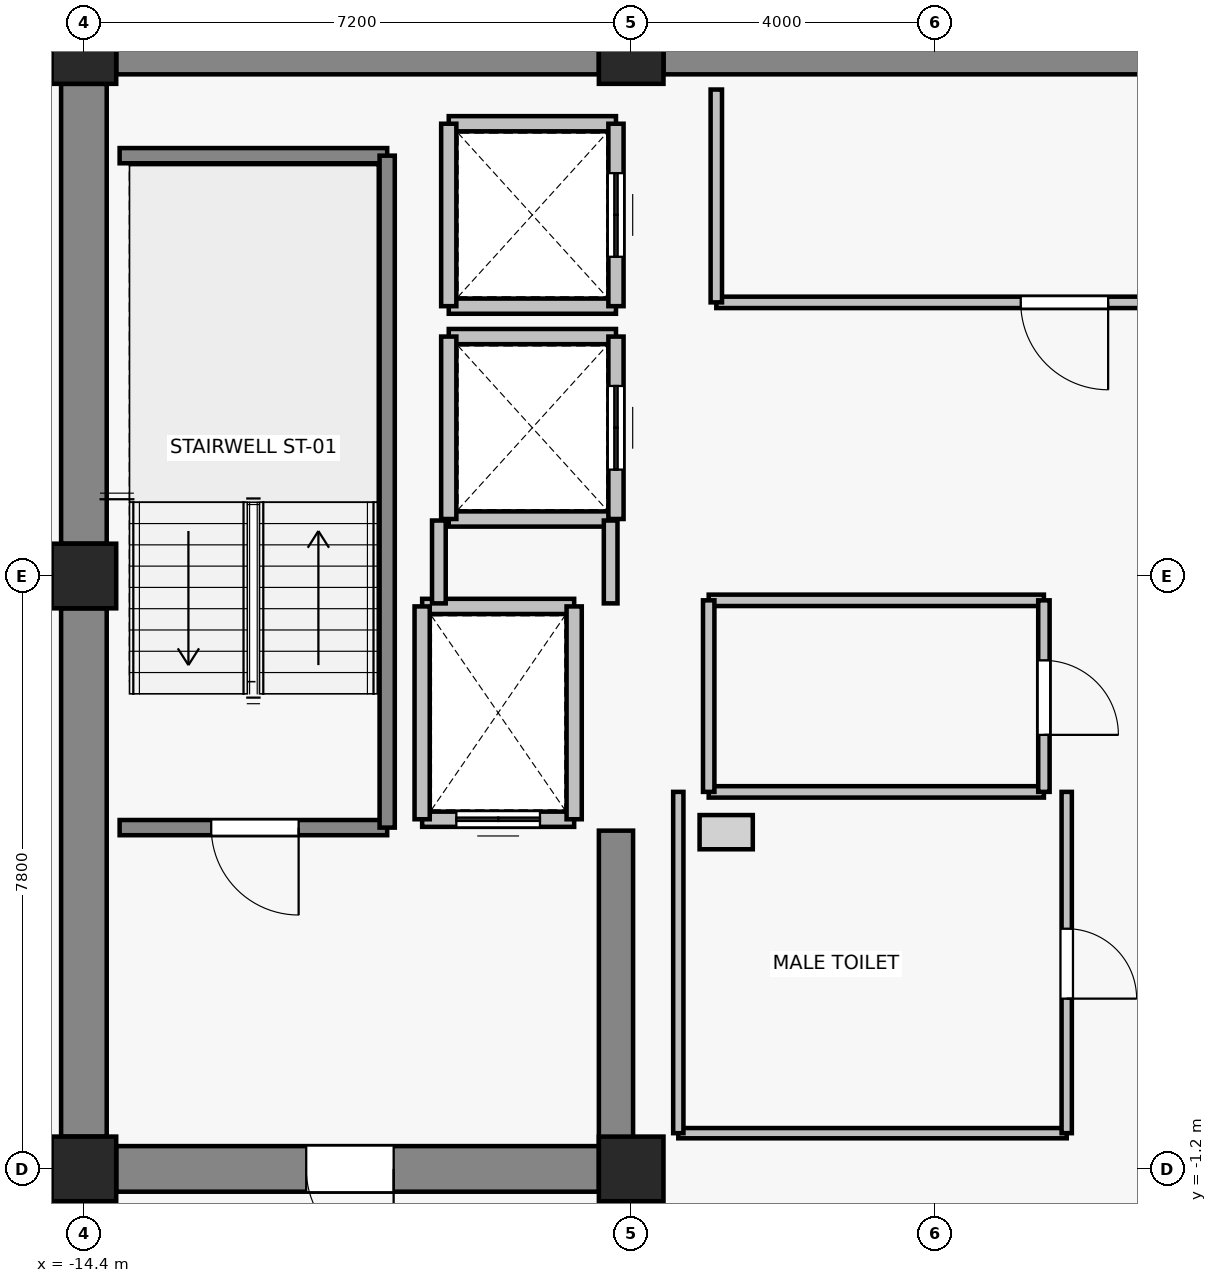
"""IFC4 building model, lengths in metres.
Left out: names, types, materials, properties, quantities, classifications, styles, units other than length and angle.
Written with IfcOpenShell. Run it as: python <this file> out.ifc"""

import sys

from ifc_helpers import new_model, si_unit, direction, frame, frame_2d, origin, origin_2d, place, context, subcontext, project, spatial, rectangle, extrude, source, transform, mapped, element, fill, save


model = new_model("IFC4")
c1 = context("Model", 3, precision=1e-05, world=origin(), true_north=direction((0.0, 1.0)))
c2 = subcontext(c1, "Body", "Model", "MODEL_VIEW")
j1 = project(units=[si_unit("LENGTHUNIT", "METRE"), si_unit("PLANEANGLEUNIT", "RADIAN")], contexts=[c1])
p1 = place(None, origin())
s1 = spatial("IfcSite", under=j1, at=p1, CompositionType="ELEMENT")
p2 = place(p1, origin())
s2 = spatial("IfcBuilding", under=s1, at=p2, CompositionType="ELEMENT")
p3 = place(p2, frame((0.0, 0.0, 265.0)))
s3 = spatial("IfcBuildingStorey", under=s2, at=p3, CompositionType="ELEMENT", Elevation=265.0)
for number, where, z_axis, x_axis in (
    (1, (-14.4, -1.2, 0.0), (0.0, 0.0, 1.0), (1.0, 0.0, 0.0)),
    (2, (-7.2, -1.2, 0.0), (0.0, 0.0, 1.0), (1.0, 0.0, 0.0)),
    (3, (-14.4, 6.6, 0.0), (0.0, 0.0, 1.0), (1.0, 0.0, 0.0)),
    (4, (-14.4, 13.5, 0.0), (0.0, 0.0, 1.0), (1.0, 0.0, 0.0)),
    (5, (-7.2, 13.5, 0.0), (0.0, 0.0, 1.0), (1.0, 0.0, 0.0)),
):
    element("IfcColumn", number, at=place(p3, frame(where, z_axis=z_axis, x_axis=x_axis)), inside=s3, PredefinedType="COLUMN", context=c2, shape_type="SweptSolid", body=[
        extrude(rectangle(XDim=0.85, YDim=0.85, at=origin_2d()), origin(), (0.0, 0.0, 1.0), 3.3),
    ])
p4 = place(p3, frame((-13.975, 13.5, 0.0), z_axis=(0.0, 0.0, 1.0), x_axis=(1.0, 0.0, 0.0)))
e6 = element("IfcWall", 6, at=p4, inside=s3, PredefinedType="SHEAR", context=c2, shape_type="SweptSolid", body=[
    extrude(rectangle(XDim=6.35, YDim=0.6, at=frame_2d((3.175, 0.0))), origin(), (0.0, 0.0, 1.0), 3.075),
])
p5 = place(p3, frame((-6.775, 13.5, 0.0), z_axis=(0.0, 0.0, 1.0), x_axis=(1.0, 0.0, 0.0)))
e7 = element("IfcWall", 7, at=p5, inside=s3, PredefinedType="SHEAR", context=c2, shape_type="SweptSolid", body=[
    extrude(rectangle(XDim=13.55, YDim=0.6, at=frame_2d((6.775, 0.0))), origin(), (0.0, 0.0, 1.0), 3.075),
])
p6 = place(p3, frame((-14.4, -0.775, 0.0), z_axis=(0.0, 0.0, 1.0), x_axis=(0.0, 1.0, 0.0)))
e8 = element("IfcWall", 8, at=p6, inside=s3, PredefinedType="SHEAR", context=c2, shape_type="SweptSolid", body=[
    extrude(rectangle(XDim=6.95, YDim=0.6, at=frame_2d((3.475, 0.0))), origin(), (0.0, 0.0, 1.0), 3.075),
])
p7 = place(p3, frame((-14.4, 7.025, 0.0), z_axis=(0.0, 0.0, 1.0), x_axis=(0.0, 1.0, 0.0)))
e9 = element("IfcWall", 9, at=p7, inside=s3, PredefinedType="SHEAR", context=c2, shape_type="SweptSolid", body=[
    extrude(rectangle(XDim=6.05, YDim=0.6, at=frame_2d((3.025, 0.0))), origin(), (0.0, 0.0, 1.0), 3.075),
])
p8 = place(p3, frame((-7.625, -1.2, 0.0), z_axis=(0.0, 0.0, 1.0), x_axis=(-1.0, 0.0, 0.0)))
e10 = element("IfcWall", 10, at=p8, inside=s3, PredefinedType="SHEAR", context=c2, shape_type="SweptSolid", body=[
    extrude(rectangle(XDim=6.35, YDim=0.6, at=frame_2d((3.175, 0.0))), origin(), (0.0, 0.0, 1.0), 3.075),
])
p9 = place(p8, frame((2.7, 0.0, 0.0)))
e11 = element("IfcOpeningElement", 11, at=p9, cuts=e10, PredefinedType="OPENING", context=c2, shape_type="SweptSolid", body=[
    extrude(rectangle(XDim=1.15, YDim=2.15, at=frame_2d((0.575, 1.075))), frame((0.0, 0.31, 0.0), z_axis=(0.0, -1.0, 0.0), x_axis=(1.0, 0.0, 0.0)), (0.0, 0.0, 1.0), 0.62),
])
p10 = place(p3, frame((-7.4, -0.9, 0.0), z_axis=(0.0, 0.0, 1.0), x_axis=(0.0, 1.0, 0.0)))
e12 = element("IfcWall", 12, at=p10, inside=s3, PredefinedType="SHEAR", context=c2, shape_type="SweptSolid", body=[
    extrude(rectangle(XDim=4.15, YDim=0.45, at=frame_2d((2.075, 0.0))), origin(), (0.0, 0.0, 1.0), 3.075),
])
p11 = place(p3, frame((-7.95, 3.4, 0.0), z_axis=(0.0, 0.0, 1.0), x_axis=(-1.0, 0.0, 0.0)))
e13 = element("IfcWall", 13, at=p11, inside=s3, PredefinedType="SOLIDWALL", context=c2, shape_type="SweptSolid", body=[
    extrude(rectangle(XDim=2.0, YDim=0.2, at=frame_2d((1.0, 0.0))), origin(), (0.0, 0.0, 1.0), 3.075),
])
p12 = place(p11, frame((0.45, 0.0, 0.0)))
e14 = element("IfcOpeningElement", 14, at=p12, cuts=e13, PredefinedType="OPENING", context=c2, shape_type="SweptSolid", body=[
    extrude(rectangle(XDim=1.1, YDim=2.2, at=frame_2d((0.55, 1.1))), frame((0.0, 0.11, 0.0), z_axis=(0.0, -1.0, 0.0), x_axis=(1.0, 0.0, 0.0)), (0.0, 0.0, 1.0), 0.22),
])
p13 = place(p3, frame((-9.95, 6.2, 0.0), z_axis=(0.0, 0.0, 1.0), x_axis=(1.0, 0.0, 0.0)))
e15 = element("IfcWall", 15, at=p13, inside=s3, PredefinedType="SOLIDWALL", context=c2, shape_type="SweptSolid", body=[
    extrude(rectangle(XDim=2.0, YDim=0.2, at=frame_2d((1.0, 0.0))), origin(), (0.0, 0.0, 1.0), 3.075),
])
for number, where, z_axis, x_axis in (
    (16, (-9.95, 3.4, 0.0), (0.0, 0.0, 1.0), (0.0, 1.0, 0.0)),
    (17, (-7.95, 6.2, 0.0), (0.0, 0.0, 1.0), (0.0, -1.0, 0.0)),
):
    element("IfcWall", number, at=place(p3, frame(where, z_axis=z_axis, x_axis=x_axis)), inside=s3, PredefinedType="SOLIDWALL", context=c2, shape_type="SweptSolid", body=[
        extrude(rectangle(XDim=2.8, YDim=0.2, at=frame_2d((1.4, 0.0))), origin(), (0.0, 0.0, 1.0), 3.075),
    ])
for number, where, z_axis, x_axis in (
    (18, (-7.4, 7.35, 0.0), (0.0, 0.0, 1.0), (-1.0, 0.0, 0.0)),
    (19, (-9.6, 9.75, 0.0), (0.0, 0.0, 1.0), (1.0, 0.0, 0.0)),
):
    element("IfcWall", number, at=place(p3, frame(where, z_axis=z_axis, x_axis=x_axis)), inside=s3, PredefinedType="SOLIDWALL", context=c2, shape_type="SweptSolid", body=[
        extrude(rectangle(XDim=2.2, YDim=0.2, at=frame_2d((1.1, 0.0))), origin(), (0.0, 0.0, 1.0), 2.615),
    ])
p14 = place(p3, frame((-9.6, 7.35, 0.0), z_axis=(0.0, 0.0, 1.0), x_axis=(0.0, 1.0, 0.0)))
e20 = element("IfcWall", 20, at=p14, inside=s3, PredefinedType="SOLIDWALL", context=c2, shape_type="SweptSolid", body=[
    extrude(rectangle(XDim=2.4, YDim=0.2, at=frame_2d((1.2, 0.0))), origin(), (0.0, 0.0, 1.0), 3.075),
])
p15 = place(p3, frame((-7.4, 9.75, 0.0), z_axis=(0.0, 0.0, 1.0), x_axis=(0.0, -1.0, 0.0)))
e21 = element("IfcWall", 21, at=p15, inside=s3, PredefinedType="SOLIDWALL", context=c2, shape_type="SweptSolid", body=[
    extrude(rectangle(XDim=2.4, YDim=0.2, at=frame_2d((1.2, 0.0))), origin(), (0.0, 0.0, 1.0), 2.615),
])
p16 = place(p15, frame((0.65, 0.0, 0.0)))
e22 = element("IfcOpeningElement", 22, at=p16, cuts=e21, PredefinedType="OPENING", context=c2, shape_type="SweptSolid", body=[
    extrude(rectangle(XDim=1.1, YDim=2.2, at=frame_2d((0.55, 1.1))), frame((0.0, 0.11, 0.0), z_axis=(0.0, -1.0, 0.0), x_axis=(1.0, 0.0, 0.0)), (0.0, 0.0, 1.0), 0.22),
])
for number, where, z_axis, x_axis in (
    (23, (-7.4, 10.15, 0.0), (0.0, 0.0, 1.0), (-1.0, 0.0, 0.0)),
    (24, (-9.6, 12.55, 0.0), (0.0, 0.0, 1.0), (1.0, 0.0, 0.0)),
):
    element("IfcWall", number, at=place(p3, frame(where, z_axis=z_axis, x_axis=x_axis)), inside=s3, PredefinedType="SOLIDWALL", context=c2, shape_type="SweptSolid", body=[
        extrude(rectangle(XDim=2.2, YDim=0.2, at=frame_2d((1.1, 0.0))), origin(), (0.0, 0.0, 1.0), 2.615),
    ])
p17 = place(p3, frame((-9.6, 10.15, 0.0), z_axis=(0.0, 0.0, 1.0), x_axis=(0.0, 1.0, 0.0)))
e25 = element("IfcWall", 25, at=p17, inside=s3, PredefinedType="SOLIDWALL", context=c2, shape_type="SweptSolid", body=[
    extrude(rectangle(XDim=2.4, YDim=0.2, at=frame_2d((1.2, 0.0))), origin(), (0.0, 0.0, 1.0), 3.075),
])
p18 = place(p3, frame((-7.4, 12.55, 0.0), z_axis=(0.0, 0.0, 1.0), x_axis=(0.0, -1.0, 0.0)))
e26 = element("IfcWall", 26, at=p18, inside=s3, PredefinedType="SOLIDWALL", context=c2, shape_type="SweptSolid", body=[
    extrude(rectangle(XDim=2.4, YDim=0.2, at=frame_2d((1.2, 0.0))), origin(), (0.0, 0.0, 1.0), 2.615),
])
p19 = place(p18, frame((0.65, 0.0, 0.0)))
e27 = element("IfcOpeningElement", 27, at=p19, cuts=e26, PredefinedType="OPENING", context=c2, shape_type="SweptSolid", body=[
    extrude(rectangle(XDim=1.1, YDim=2.2, at=frame_2d((0.55, 1.1))), frame((0.0, 0.11, 0.0), z_axis=(0.0, -1.0, 0.0), x_axis=(1.0, 0.0, 0.0)), (0.0, 0.0, 1.0), 0.22),
])
p20 = place(p3, frame((-10.41, 3.29, 0.0), z_axis=(0.0, 0.0, 1.0), x_axis=(-1.0, 0.0, 0.0)))
e28 = element("IfcWall", 28, at=p20, inside=s3, PredefinedType="SOLIDWALL", context=c2, shape_type="SweptSolid", body=[
    extrude(rectangle(XDim=3.52, YDim=0.2, at=frame_2d((1.76, 0.0))), origin(), (0.0, 0.0, 1.0), 3.075),
])
p21 = place(p20, frame((1.165, 0.0, 0.0)))
e29 = element("IfcOpeningElement", 29, at=p21, cuts=e28, PredefinedType="OPENING", context=c2, shape_type="SweptSolid", body=[
    extrude(rectangle(XDim=1.15, YDim=2.15, at=frame_2d((0.575, 1.075))), frame((0.0, 0.11, 0.0), z_axis=(0.0, -1.0, 0.0), x_axis=(1.0, 0.0, 0.0)), (0.0, 0.0, 1.0), 0.22),
])
p22 = place(p3, frame((-13.93, 12.13, 0.0), z_axis=(0.0, 0.0, 1.0), x_axis=(1.0, 0.0, 0.0)))
e30 = element("IfcWall", 30, at=p22, inside=s3, PredefinedType="SOLIDWALL", context=c2, shape_type="SweptSolid", body=[
    extrude(rectangle(XDim=3.52, YDim=0.2, at=frame_2d((1.76, 0.0))), origin(), (0.0, 0.0, 1.0), 3.075),
])
p23 = place(p3, frame((-10.41, 12.13, 0.0), z_axis=(0.0, 0.0, 1.0), x_axis=(0.0, -1.0, 0.0)))
e31 = element("IfcWall", 31, at=p23, inside=s3, PredefinedType="SOLIDWALL", context=c2, shape_type="SweptSolid", body=[
    extrude(rectangle(XDim=8.84, YDim=0.2, at=frame_2d((4.42, 0.0))), origin(), (0.0, 0.0, 1.0), 3.075),
])
p24 = place(p3, frame((-9.73, 6.24, 0.0), z_axis=(0.0, 0.0, 1.0), x_axis=(0.0, 1.0, 0.0)))
e32 = element("IfcWall", 32, at=p24, inside=s3, PredefinedType="PARTITIONING", context=c2, shape_type="SweptSolid", body=[
    extrude(rectangle(XDim=1.09, YDim=0.18, at=frame_2d((0.545, 0.0))), origin(), (0.0, 0.0, 1.0), 3.075),
])
p25 = place(p3, frame((-7.47, 7.33, 0.0), z_axis=(0.0, 0.0, 1.0), x_axis=(0.0, -1.0, 0.0)))
e33 = element("IfcWall", 33, at=p25, inside=s3, PredefinedType="PARTITIONING", context=c2, shape_type="SweptSolid", body=[
    extrude(rectangle(XDim=1.09, YDim=0.18, at=frame_2d((0.545, 0.0))), origin(), (0.0, 0.0, 1.0), 2.615),
])
p26 = place(p3, frame((6.08, 10.2, 0.0), z_axis=(0.0, 0.0, 1.0), x_axis=(-1.0, 0.0, 0.0)))
e34 = element("IfcWall", 34, at=p26, inside=s3, PredefinedType="PARTITIONING", context=c2, shape_type="SweptSolid", body=[
    extrude(rectangle(XDim=12.16, YDim=0.15, at=frame_2d((6.08, 0.0))), origin(), (0.0, 0.0, 1.0), 3.075),
])
p27 = place(p26, frame((7.005, 0.0, 0.0)))
e35 = element("IfcOpeningElement", 35, at=p27, cuts=e34, PredefinedType="OPENING", context=c2, shape_type="SweptSolid", body=[
    extrude(rectangle(XDim=1.15, YDim=2.15, at=frame_2d((0.575, 1.075))), frame((0.0, 0.085, 0.0), z_axis=(0.0, -1.0, 0.0), x_axis=(1.0, 0.0, 0.0)), (0.0, 0.0, 1.0), 0.17),
])
p28 = place(p3, frame((-6.08, 10.2, 0.0), z_axis=(0.0, 0.0, 1.0), x_axis=(0.0, 1.0, 0.0)))
e36 = element("IfcWall", 36, at=p28, inside=s3, PredefinedType="PARTITIONING", context=c2, shape_type="SweptSolid", body=[
    extrude(rectangle(XDim=2.8, YDim=0.15, at=frame_2d((1.4, 0.0))), origin(), (0.0, 0.0, 1.0), 3.075),
])
for number, where, z_axis, x_axis in (
    (37, (-1.77, 3.76, 0.0), (0.0, 0.0, 1.0), (-1.0, 0.0, 0.0)),
    (38, (-6.18, 6.28, 0.0), (0.0, 0.0, 1.0), (1.0, 0.0, 0.0)),
):
    element("IfcWall", number, at=place(p3, frame(where, z_axis=z_axis, x_axis=x_axis)), inside=s3, PredefinedType="PARTITIONING", context=c2, shape_type="SweptSolid", body=[
        extrude(rectangle(XDim=4.41, YDim=0.15, at=frame_2d((2.205, 0.0))), origin(), (0.0, 0.0, 1.0), 3.075),
    ])
p29 = place(p3, frame((-6.18, 3.76, 0.0), z_axis=(0.0, 0.0, 1.0), x_axis=(0.0, 1.0, 0.0)))
e39 = element("IfcWall", 39, at=p29, inside=s3, PredefinedType="PARTITIONING", context=c2, shape_type="SweptSolid", body=[
    extrude(rectangle(XDim=2.52, YDim=0.15, at=frame_2d((1.26, 0.0))), origin(), (0.0, 0.0, 1.0), 3.075),
])
p30 = place(p3, frame((-1.77, 6.28, 0.0), z_axis=(0.0, 0.0, 1.0), x_axis=(0.0, -1.0, 0.0)))
e40 = element("IfcWall", 40, at=p30, inside=s3, PredefinedType="PARTITIONING", context=c2, shape_type="SweptSolid", body=[
    extrude(rectangle(XDim=2.52, YDim=0.15, at=frame_2d((1.26, 0.0))), origin(), (0.0, 0.0, 1.0), 3.075),
])
p31 = place(p30, frame((0.79, 0.0, 0.0)))
e41 = element("IfcOpeningElement", 41, at=p31, cuts=e40, PredefinedType="OPENING", context=c2, shape_type="SweptSolid", body=[
    extrude(rectangle(XDim=0.98, YDim=2.15, at=frame_2d((0.49, 1.075))), frame((0.0, 0.085, 0.0), z_axis=(0.0, -1.0, 0.0), x_axis=(1.0, 0.0, 0.0)), (0.0, 0.0, 1.0), 0.17),
])
p32 = place(p3, frame((-1.47, -0.73, 0.0), z_axis=(0.0, 0.0, 1.0), x_axis=(-1.0, 0.0, 0.0)))
e42 = element("IfcWall", 42, at=p32, inside=s3, PredefinedType="PARTITIONING", context=c2, shape_type="SweptSolid", body=[
    extrude(rectangle(XDim=5.11, YDim=0.135, at=frame_2d((2.555, 0.0))), origin(), (0.0, 0.0, 1.0), 3.075),
])
p33 = place(p3, frame((-6.58, -0.73, 0.0), z_axis=(0.0, 0.0, 1.0), x_axis=(0.0, 1.0, 0.0)))
e43 = element("IfcWall", 43, at=p33, inside=s3, PredefinedType="PARTITIONING", context=c2, shape_type="SweptSolid", body=[
    extrude(rectangle(XDim=4.49, YDim=0.135, at=frame_2d((2.245, 0.0))), origin(), (0.0, 0.0, 1.0), 3.075),
])
p34 = place(p3, frame((-1.47, 3.76, 0.0), z_axis=(0.0, 0.0, 1.0), x_axis=(0.0, -1.0, 0.0)))
e44 = element("IfcWall", 44, at=p34, inside=s3, PredefinedType="PARTITIONING", context=c2, shape_type="SweptSolid", body=[
    extrude(rectangle(XDim=4.49, YDim=0.135, at=frame_2d((2.245, 0.0))), origin(), (0.0, 0.0, 1.0), 3.075),
])
p35 = place(p34, frame((1.8, 0.0, 0.0)))
e45 = element("IfcOpeningElement", 45, at=p35, cuts=e44, PredefinedType="OPENING", context=c2, shape_type="SweptSolid", body=[
    extrude(rectangle(XDim=0.92, YDim=2.1, at=frame_2d((0.46, 1.05))), frame((0.0, 0.077, 0.0), z_axis=(0.0, -1.0, 0.0), x_axis=(1.0, 0.0, 0.0)), (0.0, 0.0, 1.0), 0.155),
])
m1 = source(origin(), c2, "Body", "SweptSolid", [
    extrude(rectangle(XDim=1.1, YDim=2.2, at=frame_2d((0.55, 1.1))), frame((0.0, 0.025, 0.0), z_axis=(0.0, -1.0, 0.0), x_axis=(1.0, 0.0, 0.0)), (0.0, 0.0, 1.0), 0.05),
])
p36 = place(p12, origin())
e46 = element("IfcDoor", 46, at=p36, inside=s3, OperationType="DOUBLE_DOOR_SLIDING", PredefinedType="DOOR", context=c2, shape_type="MappedRepresentation", body=[
    mapped(m1, transform((0.0, 0.0, 0.0), x_axis=(1.0, 0.0, 0.0), y_axis=(0.0, 1.0, 0.0), z_axis=(0.0, 0.0, 1.0), scale=1.0)),
])
fill(e14, e46)
p37 = place(p16, origin())
e47 = element("IfcDoor", 47, at=p37, inside=s3, OperationType="DOUBLE_DOOR_SLIDING", PredefinedType="DOOR", context=c2, shape_type="MappedRepresentation", body=[
    mapped(m1, transform((0.0, 0.0, 0.0), x_axis=(1.0, 0.0, 0.0), y_axis=(0.0, 1.0, 0.0), z_axis=(0.0, 0.0, 1.0), scale=1.0)),
])
fill(e22, e47)
p38 = place(p19, origin())
e48 = element("IfcDoor", 48, at=p38, inside=s3, OperationType="DOUBLE_DOOR_SLIDING", PredefinedType="DOOR", context=c2, shape_type="MappedRepresentation", body=[
    mapped(m1, transform((0.0, 0.0, 0.0), x_axis=(1.0, 0.0, 0.0), y_axis=(0.0, 1.0, 0.0), z_axis=(0.0, 0.0, 1.0), scale=1.0)),
])
fill(e27, e48)
m2 = source(origin(), c2, "Body", "SweptSolid", [
    extrude(rectangle(XDim=1.15, YDim=2.15, at=frame_2d((0.575, 1.075))), frame((0.0, 0.025, 0.0), z_axis=(0.0, -1.0, 0.0), x_axis=(1.0, 0.0, 0.0)), (0.0, 0.0, 1.0), 0.05),
])
p39 = place(p21, origin())
e49 = element("IfcDoor", 49, at=p39, inside=s3, OperationType="SINGLE_SWING_LEFT", PredefinedType="DOOR", context=c2, shape_type="MappedRepresentation", body=[
    mapped(m2, transform((0.0, 0.0, 0.0), x_axis=(1.0, 0.0, 0.0), y_axis=(0.0, 1.0, 0.0), z_axis=(0.0, 0.0, 1.0), scale=1.0)),
])
fill(e29, e49)
p40 = place(p9, origin())
e50 = element("IfcDoor", 50, at=p40, inside=s3, OperationType="SINGLE_SWING_LEFT", PredefinedType="DOOR", context=c2, shape_type="MappedRepresentation", body=[
    mapped(m2, transform((0.0, 0.0, 0.0), x_axis=(1.0, 0.0, 0.0), y_axis=(0.0, 1.0, 0.0), z_axis=(0.0, 0.0, 1.0), scale=1.0)),
])
fill(e11, e50)
p41 = place(p27, origin())
e51 = element("IfcDoor", 51, at=p41, inside=s3, OperationType="SINGLE_SWING_LEFT", PredefinedType="DOOR", context=c2, shape_type="MappedRepresentation", body=[
    mapped(m2, transform((0.0, 0.0, 0.0), x_axis=(1.0, 0.0, 0.0), y_axis=(0.0, 1.0, 0.0), z_axis=(0.0, 0.0, 1.0), scale=1.0)),
])
fill(e35, e51)
m3 = source(origin(), c2, "Body", "SweptSolid", [
    extrude(rectangle(XDim=0.98, YDim=2.15, at=frame_2d((0.49, 1.075))), frame((0.0, 0.025, 0.0), z_axis=(0.0, -1.0, 0.0), x_axis=(1.0, 0.0, 0.0)), (0.0, 0.0, 1.0), 0.05),
])
p42 = place(p31, origin())
e52 = element("IfcDoor", 52, at=p42, inside=s3, OperationType="SINGLE_SWING_RIGHT", PredefinedType="DOOR", context=c2, shape_type="MappedRepresentation", body=[
    mapped(m3, transform((0.0, 0.0, 0.0), x_axis=(1.0, 0.0, 0.0), y_axis=(0.0, 1.0, 0.0), z_axis=(0.0, 0.0, 1.0), scale=1.0)),
])
fill(e41, e52)
m4 = source(origin(), c2, "Body", "SweptSolid", [
    extrude(rectangle(XDim=0.92, YDim=2.1, at=frame_2d((0.46, 1.05))), frame((0.0, 0.025, 0.0), z_axis=(0.0, -1.0, 0.0), x_axis=(1.0, 0.0, 0.0)), (0.0, 0.0, 1.0), 0.05),
])
p43 = place(p35, origin())
e53 = element("IfcDoor", 53, at=p43, inside=s3, OperationType="SINGLE_SWING_RIGHT", PredefinedType="DOOR", context=c2, shape_type="MappedRepresentation", body=[
    mapped(m4, transform((0.0, 0.0, 0.0), x_axis=(1.0, 0.0, 0.0), y_axis=(0.0, 1.0, 0.0), z_axis=(0.0, 0.0, 1.0), scale=1.0)),
])
fill(e45, e53)
save(model, sys.argv[1])
